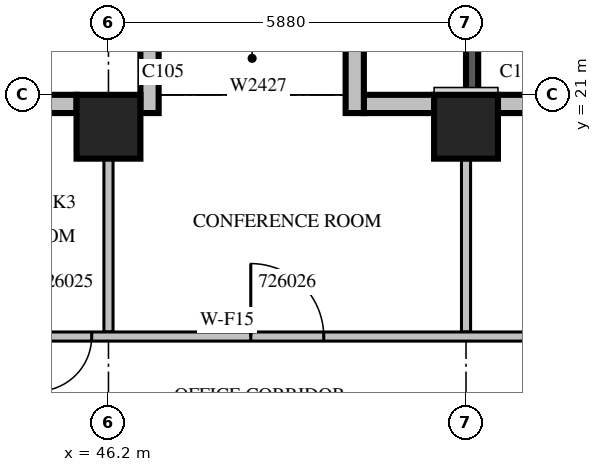
"""IFC4 building model, lengths in metres.
Left out: names, types, materials, properties, quantities, classifications, styles, units other than length and angle.
Written with IfcOpenShell. Run it as: python <this file> out.ifc"""

import sys

from ifc_helpers import new_model, si_unit, direction, frame, frame_2d, origin, origin_2d, place, context, subcontext, project, spatial, rectangle, extrude, source, transform, mapped, element, fill, save


model = new_model("IFC4")
c1 = context("Model", 3, precision=1e-05, world=origin(), true_north=direction((0.0, 1.0)))
c2 = subcontext(c1, "Body", "Model", "MODEL_VIEW")
j1 = project(units=[si_unit("LENGTHUNIT", "METRE"), si_unit("PLANEANGLEUNIT", "RADIAN")], contexts=[c1])
p1 = place(None, origin())
s1 = spatial("IfcSite", under=j1, at=p1, CompositionType="ELEMENT")
p2 = place(p1, origin())
s2 = spatial("IfcBuilding", under=s1, at=p2, CompositionType="ELEMENT")
p3 = place(p2, frame((0.0, 0.0, 120.3)))
s3 = spatial("IfcBuildingStorey", under=s2, at=p3, CompositionType="ELEMENT", Elevation=120.3)
m1 = source(origin(), c2, "Body", "SweptSolid", [
    extrude(rectangle(XDim=1.05, YDim=1.05, at=origin_2d()), origin(), (0.0, 0.0, 1.0), 4.2),
])
for number, where, z_axis, x_axis in (
    (1, (46.2, 20.475, 0.0), (0.0, 0.0, 1.0), (1.0, 0.0, 0.0)),
    (2, (52.08, 20.475, 0.0), (0.0, 0.0, 1.0), (1.0, 0.0, 0.0)),
):
    element("IfcColumn", number, at=place(p3, frame(where, z_axis=z_axis, x_axis=x_axis)), inside=s3, PredefinedType="COLUMN", context=c2, shape_type="MappedRepresentation", body=[
        mapped(m1, transform((0.0, 0.0, 0.0), scale=1.0)),
    ])
m2 = source(origin(), c2, "Body", "SweptSolid", [
    extrude(rectangle(XDim=3.9, YDim=0.2, at=frame_2d((1.95, 0.0))), origin(), (0.0, 0.0, 1.0), 3.79),
])
p4 = place(p3, frame((52.18, 21.0, 0.0), z_axis=(0.0, 0.0, 1.0), x_axis=(0.0, 1.0, 0.0)))
e3 = element("IfcWall", 3, at=p4, inside=s3, PredefinedType="SOLIDWALL", context=c2, shape_type="MappedRepresentation", body=[
    mapped(m2, transform((0.0, 0.0, 0.0), scale=1.0)),
])
m3 = source(origin(), c2, "Body", "SweptSolid", [
    extrude(rectangle(XDim=2.4, YDim=2.7, at=frame_2d((1.2, 1.35))), frame((0.0, 0.11, 0.0), z_axis=(0.0, -1.0, 0.0), x_axis=(1.0, 0.0, 0.0)), (0.0, 0.0, 1.0), 0.22),
])
p5 = place(p4, frame((0.75, 0.0, 0.6)))
e4 = element("IfcOpeningElement", 4, at=p5, cuts=e3, PredefinedType="OPENING", context=c2, shape_type="MappedRepresentation", body=[
    mapped(m3, transform((0.0, 0.0, 0.0), scale=1.0)),
])
m4 = source(origin(), c2, "Body", "SweptSolid", [
    extrude(rectangle(XDim=4.83, YDim=0.3, at=frame_2d((2.415, 0.0))), origin(), (0.0, 0.0, 1.0), 3.8),
])
p6 = place(p3, frame((57.435, 20.85, 0.0), z_axis=(0.0, 0.0, 1.0), x_axis=(-1.0, 0.0, 0.0)))
e5 = element("IfcWall", 5, at=p6, inside=s3, PredefinedType="STANDARD", context=c2, shape_type="MappedRepresentation", body=[
    mapped(m4, transform((0.0, 0.0, 0.0), scale=1.0)),
])
m5 = source(origin(), c2, "Body", "SweptSolid", [
    extrude(rectangle(XDim=1.0, YDim=2.1, at=frame_2d((0.5, 1.05))), frame((0.0, 0.16, 0.0), z_axis=(0.0, -1.0, 0.0), x_axis=(1.0, 0.0, 0.0)), (0.0, 0.0, 1.0), 0.32),
])
p7 = place(p6, frame((1.962, 0.0, 0.0)))
e6 = element("IfcOpeningElement", 6, at=p7, cuts=e5, PredefinedType="OPENING", context=c2, shape_type="MappedRepresentation", body=[
    mapped(m5, transform((0.0, 0.0, 0.0), scale=1.0)),
])
m6 = source(origin(), c2, "Body", "SweptSolid", [
    extrude(rectangle(XDim=1.155, YDim=0.3, at=frame_2d((0.578, 0.0))), origin(), (0.0, 0.0, 1.0), 3.8),
])
p8 = place(p3, frame((51.555, 20.85, 0.0), z_axis=(0.0, 0.0, 1.0), x_axis=(-1.0, 0.0, 0.0)))
e7 = element("IfcWall", 7, at=p8, inside=s3, PredefinedType="STANDARD", context=c2, shape_type="MappedRepresentation", body=[
    mapped(m6, transform((0.0, 0.0, 0.0), scale=1.0)),
])
m7 = source(origin(), c2, "Body", "SweptSolid", [
    extrude(rectangle(XDim=1.2, YDim=0.3, at=frame_2d((0.6, 0.0))), origin(), (0.0, 0.0, 1.0), 3.8),
])
for number, where, z_axis, x_axis in (
    (8, (50.25, 20.7, 0.0), (0.0, 0.0, 1.0), (0.0, 1.0, 0.0)),
    (9, (46.875, 20.7, 0.0), (0.0, 0.0, 1.0), (0.0, 1.0, 0.0)),
):
    element("IfcWall", number, at=place(p3, frame(where, z_axis=z_axis, x_axis=x_axis)), inside=s3, PredefinedType="STANDARD", context=c2, shape_type="MappedRepresentation", body=[
        mapped(m7, transform((0.0, 0.0, 0.0), scale=1.0)),
    ])
m8 = source(origin(), c2, "Body", "SweptSolid", [
    extrude(rectangle(XDim=7.35, YDim=0.3, at=frame_2d((3.675, 0.0))), origin(), (0.0, 0.0, 1.0), 3.8),
])
p9 = place(p3, frame((45.675, 20.85, 0.0), z_axis=(0.0, 0.0, 1.0), x_axis=(-1.0, 0.0, 0.0)))
e10 = element("IfcWall", 10, at=p9, inside=s3, PredefinedType="STANDARD", context=c2, shape_type="MappedRepresentation", body=[
    mapped(m8, transform((0.0, 0.0, 0.0), scale=1.0)),
])
m9 = source(origin(), c2, "Body", "SweptSolid", [
    extrude(rectangle(XDim=1.2, YDim=2.7, at=frame_2d((0.6, 1.35))), frame((0.0, 0.16, 0.0), z_axis=(0.0, -1.0, 0.0), x_axis=(1.0, 0.0, 0.0)), (0.0, 0.0, 1.0), 0.32),
])
p10 = place(p9, frame((1.339, 0.0, 0.6)))
e11 = element("IfcOpeningElement", 11, at=p10, cuts=e10, PredefinedType="OPENING", context=c2, shape_type="MappedRepresentation", body=[
    mapped(m9, transform((0.0, 0.0, 0.0), scale=1.0)),
])
p11 = place(p9, frame((6.115, 0.0, 0.0)))
e12 = element("IfcOpeningElement", 12, at=p11, cuts=e10, PredefinedType="OPENING", context=c2, shape_type="MappedRepresentation", body=[
    mapped(m5, transform((0.0, 0.0, 0.0), scale=1.0)),
])
m10 = source(origin(), c2, "Body", "SweptSolid", [
    extrude(rectangle(XDim=2.851, YDim=0.15, at=frame_2d((1.425, 0.0))), origin(), (0.0, 0.0, 1.0), 3.8),
])
for number, where, z_axis, x_axis in (
    (13, (52.08, 19.951, 0.0), (0.0, 0.0, 1.0), (0.0, -1.0, 0.0)),
    (14, (46.2, 17.1, 0.0), (0.0, 0.0, 1.0), (0.0, 1.0, 0.0)),
):
    element("IfcWall", number, at=place(p3, frame(where, z_axis=z_axis, x_axis=x_axis)), inside=s3, PredefinedType="PARTITIONING", context=c2, shape_type="MappedRepresentation", body=[
        mapped(m10, transform((0.0, 0.0, 0.0), scale=1.0)),
    ])
m11 = source(origin(), c2, "Body", "SweptSolid", [
    extrude(rectangle(XDim=37.5, YDim=0.15, at=frame_2d((18.75, 0.0))), origin(), (0.0, 0.0, 1.0), 3.8),
])
p12 = place(p3, frame((29.4, 17.025, 0.0), z_axis=(0.0, 0.0, 1.0), x_axis=(1.0, 0.0, 0.0)))
e15 = element("IfcWall", 15, at=p12, inside=s3, PredefinedType="PARTITIONING", context=c2, shape_type="MappedRepresentation", body=[
    mapped(m11, transform((0.0, 0.0, 0.0), scale=1.0)),
])
m12 = source(origin(), c2, "Body", "SweptSolid", [
    extrude(rectangle(XDim=1.0, YDim=2.1, at=frame_2d((0.5, 1.05))), frame((0.0, 0.085, 0.0), z_axis=(0.0, -1.0, 0.0), x_axis=(1.0, 0.0, 0.0)), (0.0, 0.0, 1.0), 0.17),
])
p13 = place(p12, frame((1.357, 0.0, 0.0)))
e16 = element("IfcOpeningElement", 16, at=p13, cuts=e15, PredefinedType="OPENING", context=c2, shape_type="MappedRepresentation", body=[
    mapped(m12, transform((0.0, 0.0, 0.0), scale=1.0)),
])
p14 = place(p12, frame((4.669, 0.0, 0.0)))
e17 = element("IfcOpeningElement", 17, at=p14, cuts=e15, PredefinedType="OPENING", context=c2, shape_type="MappedRepresentation", body=[
    mapped(m12, transform((0.0, 0.0, 0.0), scale=1.0)),
])
p15 = place(p12, frame((7.012, 0.0, 0.0)))
e18 = element("IfcOpeningElement", 18, at=p15, cuts=e15, PredefinedType="OPENING", context=c2, shape_type="MappedRepresentation", body=[
    mapped(m12, transform((0.0, 0.0, 0.0), scale=1.0)),
])
m13 = source(origin(), c2, "Body", "SweptSolid", [
    extrude(rectangle(XDim=0.9, YDim=2.1, at=frame_2d((0.45, 1.05))), frame((0.0, 0.085, 0.0), z_axis=(0.0, -1.0, 0.0), x_axis=(1.0, 0.0, 0.0)), (0.0, 0.0, 1.0), 0.17),
])
p16 = place(p12, frame((10.05, 0.0, 0.0)))
e19 = element("IfcOpeningElement", 19, at=p16, cuts=e15, PredefinedType="OPENING", context=c2, shape_type="MappedRepresentation", body=[
    mapped(m13, transform((0.0, 0.0, 0.0), scale=1.0)),
])
p17 = place(p12, frame((13.474, 0.0, 0.0)))
e20 = element("IfcOpeningElement", 20, at=p17, cuts=e15, PredefinedType="OPENING", context=c2, shape_type="MappedRepresentation", body=[
    mapped(m12, transform((0.0, 0.0, 0.0), scale=1.0)),
])
p18 = place(p12, frame((15.624, 0.0, 0.0)))
e21 = element("IfcOpeningElement", 21, at=p18, cuts=e15, PredefinedType="OPENING", context=c2, shape_type="MappedRepresentation", body=[
    mapped(m13, transform((0.0, 0.0, 0.0), scale=1.0)),
])
m14 = source(origin(), c2, "Body", "SweptSolid", [
    extrude(rectangle(XDim=1.2, YDim=2.1, at=frame_2d((0.6, 1.05))), frame((0.0, 0.085, 0.0), z_axis=(0.0, -1.0, 0.0), x_axis=(1.0, 0.0, 0.0)), (0.0, 0.0, 1.0), 0.17),
])
p19 = place(p12, frame((19.14, 0.0, 0.0)))
e22 = element("IfcOpeningElement", 22, at=p19, cuts=e15, PredefinedType="OPENING", context=c2, shape_type="MappedRepresentation", body=[
    mapped(m14, transform((0.0, 0.0, 0.0), scale=1.0)),
])
p20 = place(p12, frame((25.02, 0.0, 0.0)))
e23 = element("IfcOpeningElement", 23, at=p20, cuts=e15, PredefinedType="OPENING", context=c2, shape_type="MappedRepresentation", body=[
    mapped(m14, transform((0.0, 0.0, 0.0), scale=1.0)),
])
p21 = place(p12, frame((30.052, 0.0, 0.0)))
e24 = element("IfcOpeningElement", 24, at=p21, cuts=e15, PredefinedType="OPENING", context=c2, shape_type="MappedRepresentation", body=[
    mapped(m12, transform((0.0, 0.0, 0.0), scale=1.0)),
])
p22 = place(p12, frame((33.608, 0.0, 0.0)))
e25 = element("IfcOpeningElement", 25, at=p22, cuts=e15, PredefinedType="OPENING", context=c2, shape_type="MappedRepresentation", body=[
    mapped(m12, transform((0.0, 0.0, 0.0), scale=1.0)),
])
p23 = place(p12, frame((36.124, 0.0, 0.0)))
e26 = element("IfcOpeningElement", 26, at=p23, cuts=e15, PredefinedType="OPENING", context=c2, shape_type="MappedRepresentation", body=[
    mapped(m12, transform((0.0, 0.0, 0.0), scale=1.0)),
])
m15 = source(origin(), c2, "Body", "SweptSolid", [
    extrude(rectangle(XDim=0.9, YDim=2.1, at=frame_2d((0.45, 1.05))), frame((0.0, 0.025, 0.0), z_axis=(0.0, -1.0, 0.0), x_axis=(1.0, 0.0, 0.0)), (0.0, 0.0, 1.0), 0.05),
])
p24 = place(p18, origin())
e27 = element("IfcDoor", 27, at=p24, inside=s3, OperationType="SINGLE_SWING_RIGHT", PredefinedType="DOOR", context=c2, shape_type="MappedRepresentation", body=[
    mapped(m15, transform((0.0, 0.0, 0.0), scale=1.0)),
])
fill(e21, e27)
m16 = source(origin(), c2, "Body", "SweptSolid", [
    extrude(rectangle(XDim=1.2, YDim=2.1, at=frame_2d((0.6, 1.05))), frame((0.0, 0.025, 0.0), z_axis=(0.0, -1.0, 0.0), x_axis=(1.0, 0.0, 0.0)), (0.0, 0.0, 1.0), 0.05),
])
p25 = place(p19, origin())
e28 = element("IfcDoor", 28, at=p25, inside=s3, OperationType="SINGLE_SWING_LEFT", PredefinedType="DOOR", context=c2, shape_type="MappedRepresentation", body=[
    mapped(m16, transform((0.0, 0.0, 0.0), scale=1.0)),
])
fill(e22, e28)
save(model, sys.argv[1])
